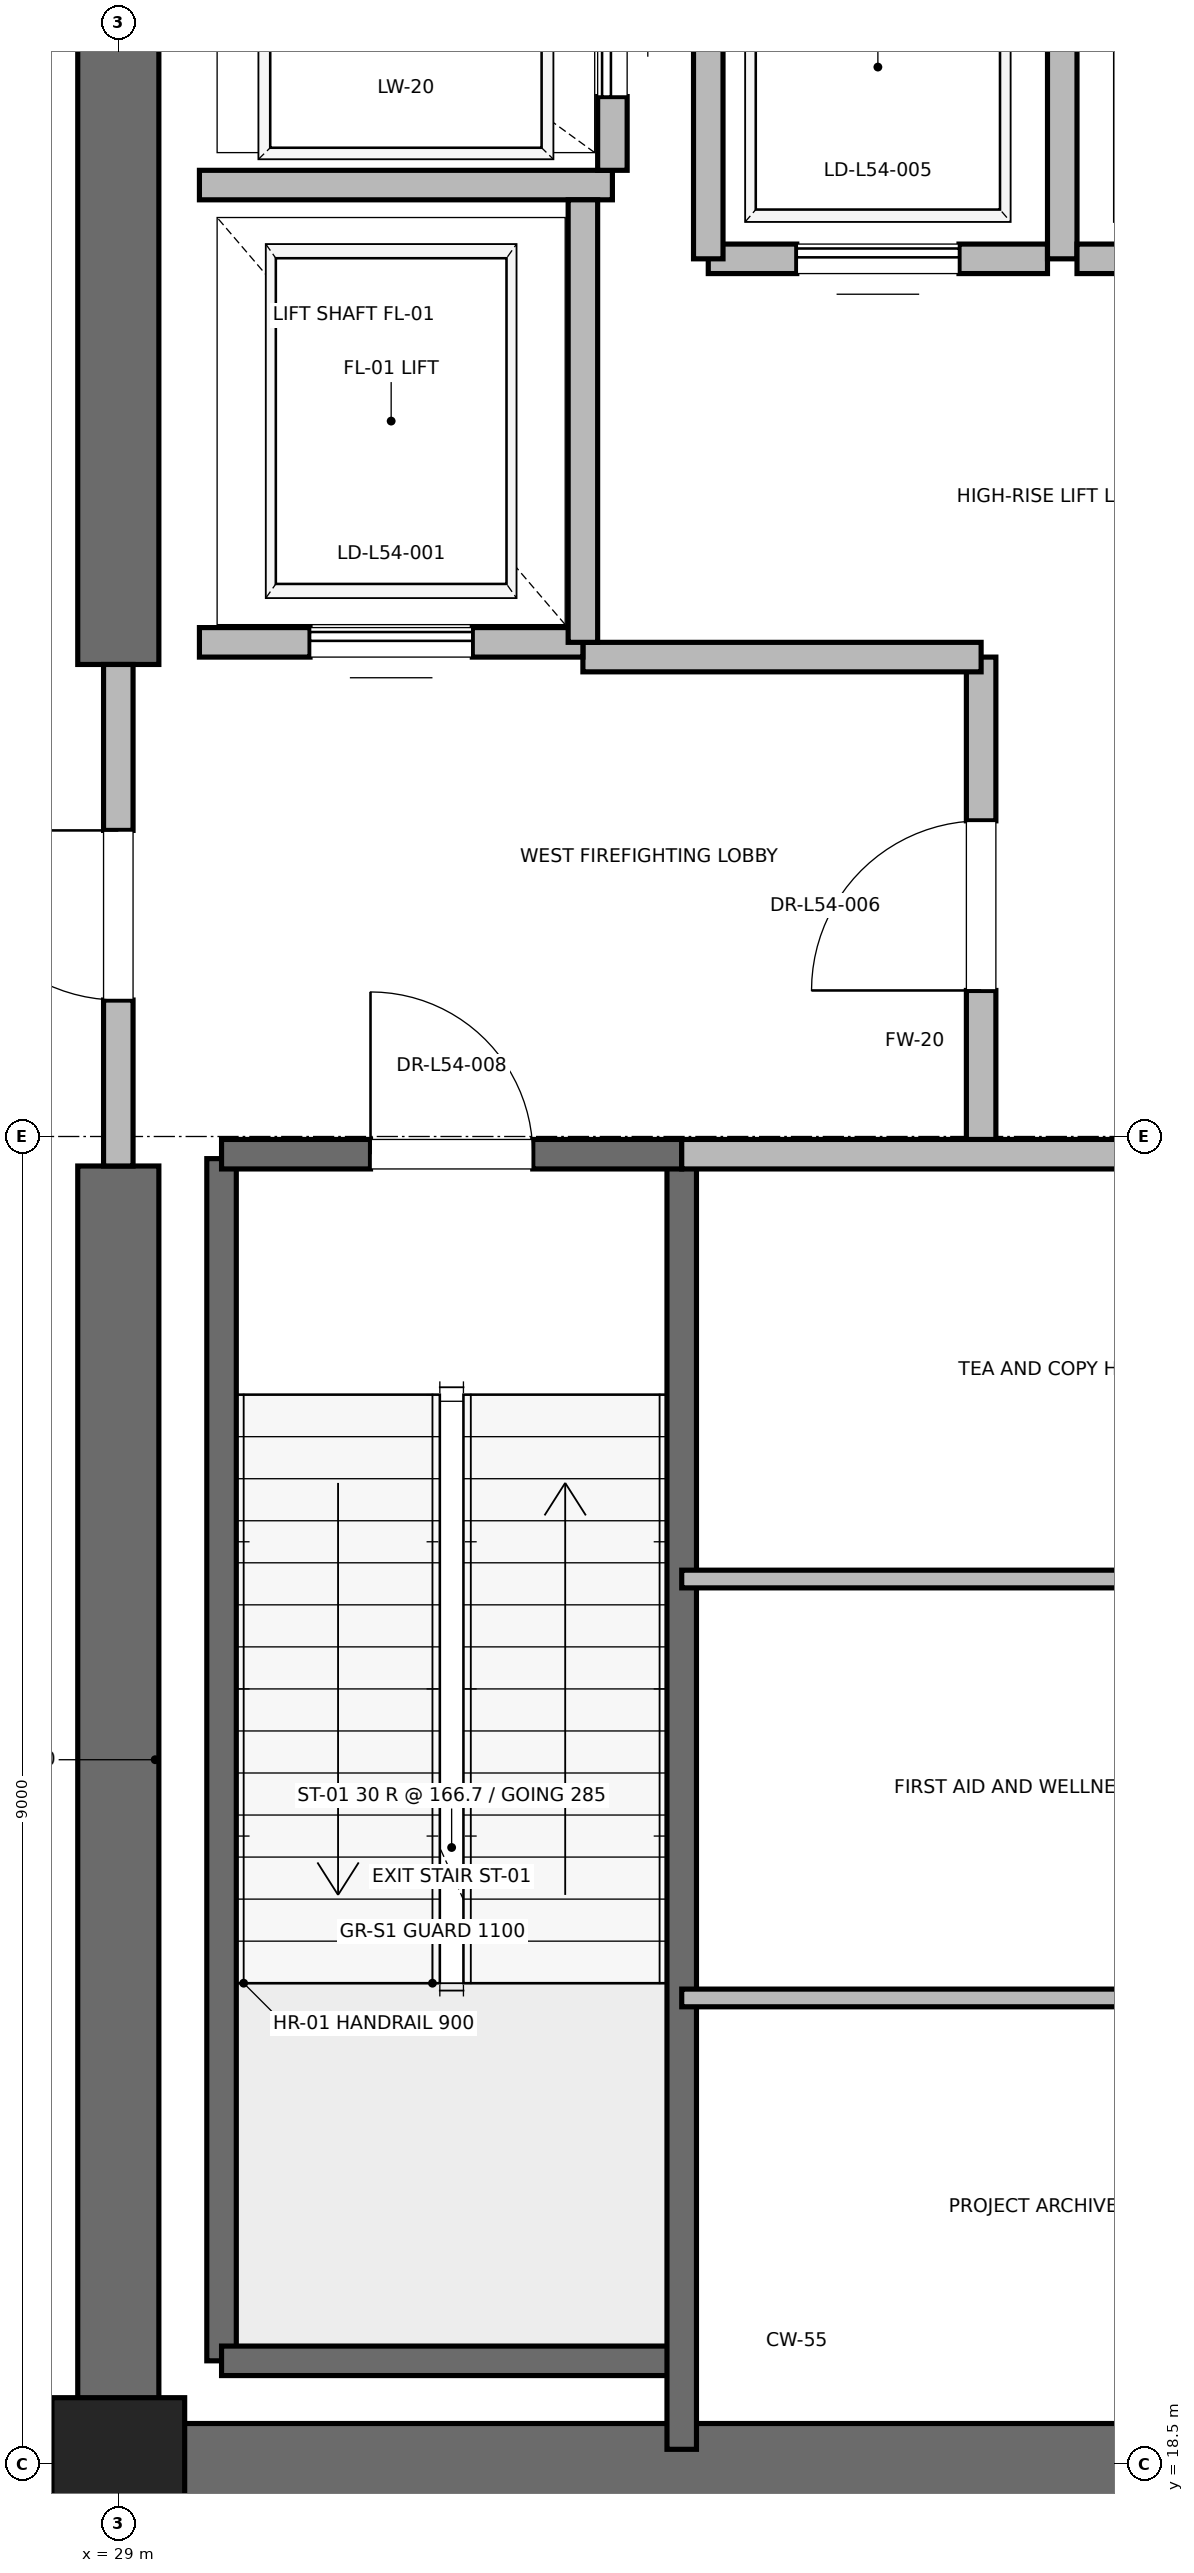
"""IFC4 building model, lengths in metres.
Left out: names, types, materials, properties, quantities, classifications, styles, units other than length and angle.
Written with IfcOpenShell. Run it as: python <this file> out.ifc"""

import sys

from ifc_helpers import new_model, si_unit, direction, frame, frame_2d, origin, origin_2d, place, context, subcontext, project, spatial, rectangle, extrude, element, fill, save


model = new_model("IFC4")
c1 = context("Model", 3, precision=1e-05, world=origin(), true_north=direction((0.0, 1.0)))
c2 = subcontext(c1, "Body", "Model", "MODEL_VIEW")
j1 = project(units=[si_unit("LENGTHUNIT", "METRE"), si_unit("PLANEANGLEUNIT", "RADIAN")], contexts=[c1])
p1 = place(None, origin())
s1 = spatial("IfcSite", under=j1, at=p1, CompositionType="ELEMENT")
p2 = place(p1, origin())
s2 = spatial("IfcBuilding", under=s1, at=p2, CompositionType="ELEMENT")
p3 = place(p2, frame((0.0, 0.0, 233.2)))
s3 = spatial("IfcBuildingStorey", under=s2, at=p3, CompositionType="ELEMENT", Elevation=233.2)
p4 = place(p3, frame((29.0, 18.5, 0.0), z_axis=(0.0, 0.0, 1.0), x_axis=(1.0, 0.0, 0.0)))
e1 = element("IfcColumn", 1, at=p4, inside=s3, PredefinedType="PILASTER", context=c2, shape_type="SweptSolid", body=[
    extrude(rectangle(XDim=0.9, YDim=0.9, at=origin_2d()), origin(), (0.0, 0.0, 1.0), 5.0),
])
p5 = place(p3, frame((29.0, 18.5, 0.0), z_axis=(0.0, 0.0, 1.0), x_axis=(1.0, 0.0, 0.0)))
e2 = element("IfcWall", 2, at=p5, inside=s3, PredefinedType="SHEAR", context=c2, shape_type="SweptSolid", body=[
    extrude(rectangle(XDim=9.2, YDim=0.55, at=frame_2d((4.6, 0.0))), origin(), (0.0, 0.0, 1.0), 4.7),
])
p6 = place(p3, frame((29.0, 18.5, 0.0), z_axis=(0.0, 0.0, 1.0), x_axis=(0.0, 1.0, 0.0)))
e3 = element("IfcWall", 3, at=p6, inside=s3, PredefinedType="SHEAR", context=c2, shape_type="SweptSolid", body=[
    extrude(rectangle(XDim=8.8, YDim=0.55, at=frame_2d((4.4, 0.0))), origin(), (0.0, 0.0, 1.0), 4.7),
])
p7 = place(p3, frame((29.0, 30.7, 0.0), z_axis=(0.0, 0.0, 1.0), x_axis=(0.0, 1.0, 0.0)))
e4 = element("IfcWall", 4, at=p7, inside=s3, PredefinedType="SHEAR", context=c2, shape_type="SweptSolid", body=[
    extrude(rectangle(XDim=5.8, YDim=0.55, at=frame_2d((2.9, 0.0))), origin(), (0.0, 0.0, 1.0), 4.7),
])
p8 = place(p3, frame((29.7, 19.2, 0.0), z_axis=(0.0, 0.0, 1.0), x_axis=(0.0, 1.0, 0.0)))
e5 = element("IfcWall", 5, at=p8, inside=s3, PredefinedType="SOLIDWALL", context=c2, shape_type="SweptSolid", body=[
    extrude(rectangle(XDim=8.15, YDim=0.2, at=frame_2d((4.075, 0.0))), origin(), (0.0, 0.0, 1.0), 4.7),
])
p9 = place(p3, frame((29.7, 19.2, 0.0), z_axis=(0.0, 0.0, 1.0), x_axis=(1.0, 0.0, 0.0)))
e6 = element("IfcWall", 6, at=p9, inside=s3, PredefinedType="SOLIDWALL", context=c2, shape_type="SweptSolid", body=[
    extrude(rectangle(XDim=3.12, YDim=0.2, at=frame_2d((1.56, 0.0))), origin(), (0.0, 0.0, 1.0), 4.7),
])
p10 = place(p3, frame((32.82, 18.6, 0.0), z_axis=(0.0, 0.0, 1.0), x_axis=(0.0, 1.0, 0.0)))
e7 = element("IfcWall", 7, at=p10, inside=s3, PredefinedType="SOLIDWALL", context=c2, shape_type="SweptSolid", body=[
    extrude(rectangle(XDim=8.78, YDim=0.2, at=frame_2d((4.39, 0.0))), origin(), (0.0, 0.0, 1.0), 4.7),
])
p11 = place(p3, frame((29.7, 27.38, 0.0), z_axis=(0.0, 0.0, 1.0), x_axis=(1.0, 0.0, 0.0)))
e8 = element("IfcWall", 8, at=p11, inside=s3, PredefinedType="SOLIDWALL", context=c2, shape_type="SweptSolid", body=[
    extrude(rectangle(XDim=3.12, YDim=0.2, at=frame_2d((1.56, 0.0))), origin(), (0.0, 0.0, 1.0), 4.7),
])
p12 = place(p11, frame((1.01, 0.0, 0.0)))
e9 = element("IfcOpeningElement", 9, at=p12, cuts=e8, PredefinedType="OPENING", context=c2, shape_type="SweptSolid", body=[
    extrude(rectangle(XDim=1.1, YDim=2.15, at=frame_2d((0.55, 1.075))), frame((0.0, 0.1, 0.0), z_axis=(0.0, -1.0, 0.0), x_axis=(1.0, 0.0, 0.0)), (0.0, 0.0, 1.0), 0.2),
])
p13 = place(p3, frame((34.85, 27.38, 0.0), z_axis=(0.0, 0.0, 1.0), x_axis=(0.0, 1.0, 0.0)))
e10 = element("IfcWall", 10, at=p13, inside=s3, PredefinedType="PARTITIONING", context=c2, shape_type="SweptSolid", body=[
    extrude(rectangle(XDim=3.37, YDim=0.2, at=frame_2d((1.685, 0.0))), origin(), (0.0, 0.0, 1.0), 4.7),
])
p14 = place(p13, frame((1.11, 0.0, 0.0)))
e11 = element("IfcOpeningElement", 11, at=p14, cuts=e10, PredefinedType="OPENING", context=c2, shape_type="SweptSolid", body=[
    extrude(rectangle(XDim=1.15, YDim=2.2, at=frame_2d((0.575, 1.1))), frame((0.0, 0.1, 0.0), z_axis=(0.0, -1.0, 0.0), x_axis=(1.0, 0.0, 0.0)), (0.0, 0.0, 1.0), 0.2),
])
p15 = place(p3, frame((29.0, 27.3, 0.0), z_axis=(0.0, 0.0, 1.0), x_axis=(0.0, 1.0, 0.0)))
e12 = element("IfcWall", 12, at=p15, inside=s3, PredefinedType="PARTITIONING", context=c2, shape_type="SweptSolid", body=[
    extrude(rectangle(XDim=3.4, YDim=0.2, at=frame_2d((1.7, 0.0))), origin(), (0.0, 0.0, 1.0), 3.68),
])
p16 = place(p15, frame((1.125, 0.0, 0.0)))
e13 = element("IfcOpeningElement", 13, at=p16, cuts=e12, PredefinedType="OPENING", context=c2, shape_type="SweptSolid", body=[
    extrude(rectangle(XDim=1.15, YDim=2.2, at=frame_2d((0.575, 1.1))), frame((0.0, 0.1, 0.0), z_axis=(0.0, -1.0, 0.0), x_axis=(1.0, 0.0, 0.0)), (0.0, 0.0, 1.0), 0.2),
])
p17 = place(p3, frame((32.82, 27.38, 0.0), z_axis=(0.0, 0.0, 1.0), x_axis=(1.0, 0.0, 0.0)))
e14 = element("IfcWall", 14, at=p17, inside=s3, PredefinedType="PARTITIONING", context=c2, shape_type="SweptSolid", body=[
    extrude(rectangle(XDim=5.62, YDim=0.2, at=frame_2d((2.81, 0.0))), origin(), (0.0, 0.0, 1.0), 4.7),
])
p18 = place(p3, frame((32.15, 30.75, 0.0), z_axis=(0.0, 0.0, 1.0), x_axis=(1.0, 0.0, 0.0)))
e15 = element("IfcWall", 15, at=p18, inside=s3, PredefinedType="PARTITIONING", context=c2, shape_type="SweptSolid", body=[
    extrude(rectangle(XDim=2.7, YDim=0.2, at=frame_2d((1.35, 0.0))), origin(), (0.0, 0.0, 1.0), 4.7),
])
p19 = place(p3, frame((29.55, 30.85, 0.0), z_axis=(0.0, 0.0, 1.0), x_axis=(1.0, 0.0, 0.0)))
e16 = element("IfcWall", 16, at=p19, inside=s3, PredefinedType="SOLIDWALL", context=c2, shape_type="SweptSolid", body=[
    extrude(rectangle(XDim=2.6, YDim=0.2, at=frame_2d((1.3, 0.0))), origin(), (0.0, 0.0, 1.0), 3.68),
])
p20 = place(p19, frame((0.75, 0.0, 0.0)))
e17 = element("IfcOpeningElement", 17, at=p20, cuts=e16, PredefinedType="OPENING", context=c2, shape_type="SweptSolid", body=[
    extrude(rectangle(XDim=1.1, YDim=2.2, at=frame_2d((0.55, 1.1))), frame((0.0, 0.1, 0.0), z_axis=(0.0, -1.0, 0.0), x_axis=(1.0, 0.0, 0.0)), (0.0, 0.0, 1.0), 0.2),
])
p21 = place(p3, frame((29.55, 33.95, 0.0), z_axis=(0.0, 0.0, 1.0), x_axis=(1.0, 0.0, 0.0)))
e18 = element("IfcWall", 18, at=p21, inside=s3, PredefinedType="SOLIDWALL", context=c2, shape_type="SweptSolid", body=[
    extrude(rectangle(XDim=2.8, YDim=0.2, at=frame_2d((1.4, 0.0))), origin(), (0.0, 0.0, 1.0), 4.7),
])
p22 = place(p3, frame((32.15, 30.85, 0.0), z_axis=(0.0, 0.0, 1.0), x_axis=(0.0, 1.0, 0.0)))
e19 = element("IfcWall", 19, at=p22, inside=s3, PredefinedType="SOLIDWALL", context=c2, shape_type="SweptSolid", body=[
    extrude(rectangle(XDim=3.0, YDim=0.2, at=frame_2d((1.5, 0.0))), origin(), (0.0, 0.0, 1.0), 4.7),
])
p23 = place(p3, frame((32.35, 34.05, 0.0), z_axis=(0.0, 0.0, 1.0), x_axis=(0.0, 1.0, 0.0)))
e20 = element("IfcWall", 20, at=p23, inside=s3, PredefinedType="SOLIDWALL", context=c2, shape_type="SweptSolid", body=[
    extrude(rectangle(XDim=2.1, YDim=0.2, at=frame_2d((1.05, 0.0))), origin(), (0.0, 0.0, 1.0), 4.7),
])
p24 = place(p23, frame((0.5, 0.0, 0.0)))
e21 = element("IfcOpeningElement", 21, at=p24, cuts=e20, PredefinedType="OPENING", context=c2, shape_type="SweptSolid", body=[
    extrude(rectangle(XDim=1.1, YDim=2.2, at=frame_2d((0.55, 1.1))), frame((0.0, 0.1, 0.0), z_axis=(0.0, -1.0, 0.0), x_axis=(1.0, 0.0, 0.0)), (0.0, 0.0, 1.0), 0.2),
])
p25 = place(p3, frame((33.0, 33.45, 0.0), z_axis=(0.0, 0.0, 1.0), x_axis=(1.0, 0.0, 0.0)))
e22 = element("IfcWall", 22, at=p25, inside=s3, PredefinedType="SOLIDWALL", context=c2, shape_type="SweptSolid", body=[
    extrude(rectangle(XDim=2.3, YDim=0.2, at=frame_2d((1.15, 0.0))), origin(), (0.0, 0.0, 1.0), 4.7),
])
p26 = place(p25, frame((0.6, 0.0, 0.0)))
e23 = element("IfcOpeningElement", 23, at=p26, cuts=e22, PredefinedType="OPENING", context=c2, shape_type="SweptSolid", body=[
    extrude(rectangle(XDim=1.1, YDim=2.2, at=frame_2d((0.55, 1.1))), frame((0.0, 0.1, 0.0), z_axis=(0.0, -1.0, 0.0), x_axis=(1.0, 0.0, 0.0)), (0.0, 0.0, 1.0), 0.2),
])
p27 = place(p3, frame((33.0, 36.05, 0.0), z_axis=(0.0, 0.0, 1.0), x_axis=(0.0, -1.0, 0.0)))
e24 = element("IfcWall", 24, at=p27, inside=s3, PredefinedType="SOLIDWALL", context=c2, shape_type="SweptSolid", body=[
    extrude(rectangle(XDim=2.6, YDim=0.2, at=frame_2d((1.3, 0.0))), origin(), (0.0, 0.0, 1.0), 4.7),
])
p28 = place(p3, frame((35.4, 33.45, 0.0), z_axis=(0.0, 0.0, 1.0), x_axis=(0.0, 1.0, 0.0)))
e25 = element("IfcWall", 25, at=p28, inside=s3, PredefinedType="SOLIDWALL", context=c2, shape_type="SweptSolid", body=[
    extrude(rectangle(XDim=2.6, YDim=0.2, at=frame_2d((1.3, 0.0))), origin(), (0.0, 0.0, 1.0), 3.68),
])
p29 = place(p3, frame((35.5, 33.45, 0.0), z_axis=(0.0, 0.0, 1.0), x_axis=(1.0, 0.0, 0.0)))
e26 = element("IfcWall", 26, at=p29, inside=s3, PredefinedType="SOLIDWALL", context=c2, shape_type="SweptSolid", body=[
    extrude(rectangle(XDim=2.3, YDim=0.2, at=frame_2d((1.15, 0.0))), origin(), (0.0, 0.0, 1.0), 4.7),
])
p30 = place(p29, frame((0.6, 0.0, 0.0)))
e27 = element("IfcOpeningElement", 27, at=p30, cuts=e26, PredefinedType="OPENING", context=c2, shape_type="SweptSolid", body=[
    extrude(rectangle(XDim=1.1, YDim=2.2, at=frame_2d((0.55, 1.1))), frame((0.0, 0.1, 0.0), z_axis=(0.0, -1.0, 0.0), x_axis=(1.0, 0.0, 0.0)), (0.0, 0.0, 1.0), 0.2),
])
for number, where, z_axis, x_axis in (
    (28, (32.82, 21.66, 0.0), (0.0, 0.0, 1.0), (1.0, 0.0, 0.0)),
    (29, (32.82, 24.5, 0.0), (0.0, 0.0, 1.0), (1.0, 0.0, 0.0)),
):
    element("IfcWall", number, at=place(p3, frame(where, z_axis=z_axis, x_axis=x_axis)), inside=s3, PredefinedType="PARTITIONING", context=c2, shape_type="SweptSolid", body=[
        extrude(rectangle(XDim=5.23, YDim=0.12, at=frame_2d((2.615, 0.0))), origin(), (0.0, 0.0, 1.0), 2.85),
    ])
p31 = place(p12, origin())
e30 = element("IfcDoor", 30, at=p31, inside=s3, OperationType="SINGLE_SWING_LEFT", PredefinedType="DOOR", context=c2, shape_type="SweptSolid", body=[
    extrude(rectangle(XDim=1.1, YDim=2.15, at=frame_2d((0.55, 1.075))), frame((0.0, 0.025, 0.0), z_axis=(0.0, -1.0, 0.0), x_axis=(1.0, 0.0, 0.0)), (0.0, 0.0, 1.0), 0.05),
])
fill(e9, e30)
p32 = place(p14, origin())
e31 = element("IfcDoor", 31, at=p32, inside=s3, OperationType="SINGLE_SWING_LEFT", PredefinedType="DOOR", context=c2, shape_type="SweptSolid", body=[
    extrude(rectangle(XDim=1.15, YDim=2.2, at=frame_2d((0.575, 1.1))), frame((0.0, 0.025, 0.0), z_axis=(0.0, -1.0, 0.0), x_axis=(1.0, 0.0, 0.0)), (0.0, 0.0, 1.0), 0.05),
])
fill(e11, e31)
p33 = place(p16, origin())
e32 = element("IfcDoor", 32, at=p33, inside=s3, OperationType="SINGLE_SWING_RIGHT", PredefinedType="DOOR", context=c2, shape_type="SweptSolid", body=[
    extrude(rectangle(XDim=1.15, YDim=2.2, at=frame_2d((0.575, 1.1))), frame((0.0, 0.025, 0.0), z_axis=(0.0, -1.0, 0.0), x_axis=(1.0, 0.0, 0.0)), (0.0, 0.0, 1.0), 0.05),
])
fill(e13, e32)
p34 = place(p20, origin())
e33 = element("IfcDoor", 33, at=p34, inside=s3, OperationType="SLIDING_TO_RIGHT", PredefinedType="DOOR", context=c2, shape_type="SweptSolid", body=[
    extrude(rectangle(XDim=1.1, YDim=2.2, at=frame_2d((0.55, 1.1))), frame((0.0, 0.025, 0.0), z_axis=(0.0, -1.0, 0.0), x_axis=(1.0, 0.0, 0.0)), (0.0, 0.0, 1.0), 0.05),
])
fill(e17, e33)
p35 = place(p24, origin())
e34 = element("IfcDoor", 34, at=p35, inside=s3, OperationType="SLIDING_TO_RIGHT", PredefinedType="DOOR", context=c2, shape_type="SweptSolid", body=[
    extrude(rectangle(XDim=1.1, YDim=2.2, at=frame_2d((0.55, 1.1))), frame((0.0, 0.025, 0.0), z_axis=(0.0, -1.0, 0.0), x_axis=(1.0, 0.0, 0.0)), (0.0, 0.0, 1.0), 0.05),
])
fill(e21, e34)
p36 = place(p26, origin())
e35 = element("IfcDoor", 35, at=p36, inside=s3, OperationType="SLIDING_TO_RIGHT", PredefinedType="DOOR", context=c2, shape_type="SweptSolid", body=[
    extrude(rectangle(XDim=1.1, YDim=2.2, at=frame_2d((0.55, 1.1))), frame((0.0, 0.025, 0.0), z_axis=(0.0, -1.0, 0.0), x_axis=(1.0, 0.0, 0.0)), (0.0, 0.0, 1.0), 0.05),
])
fill(e23, e35)
save(model, sys.argv[1])
